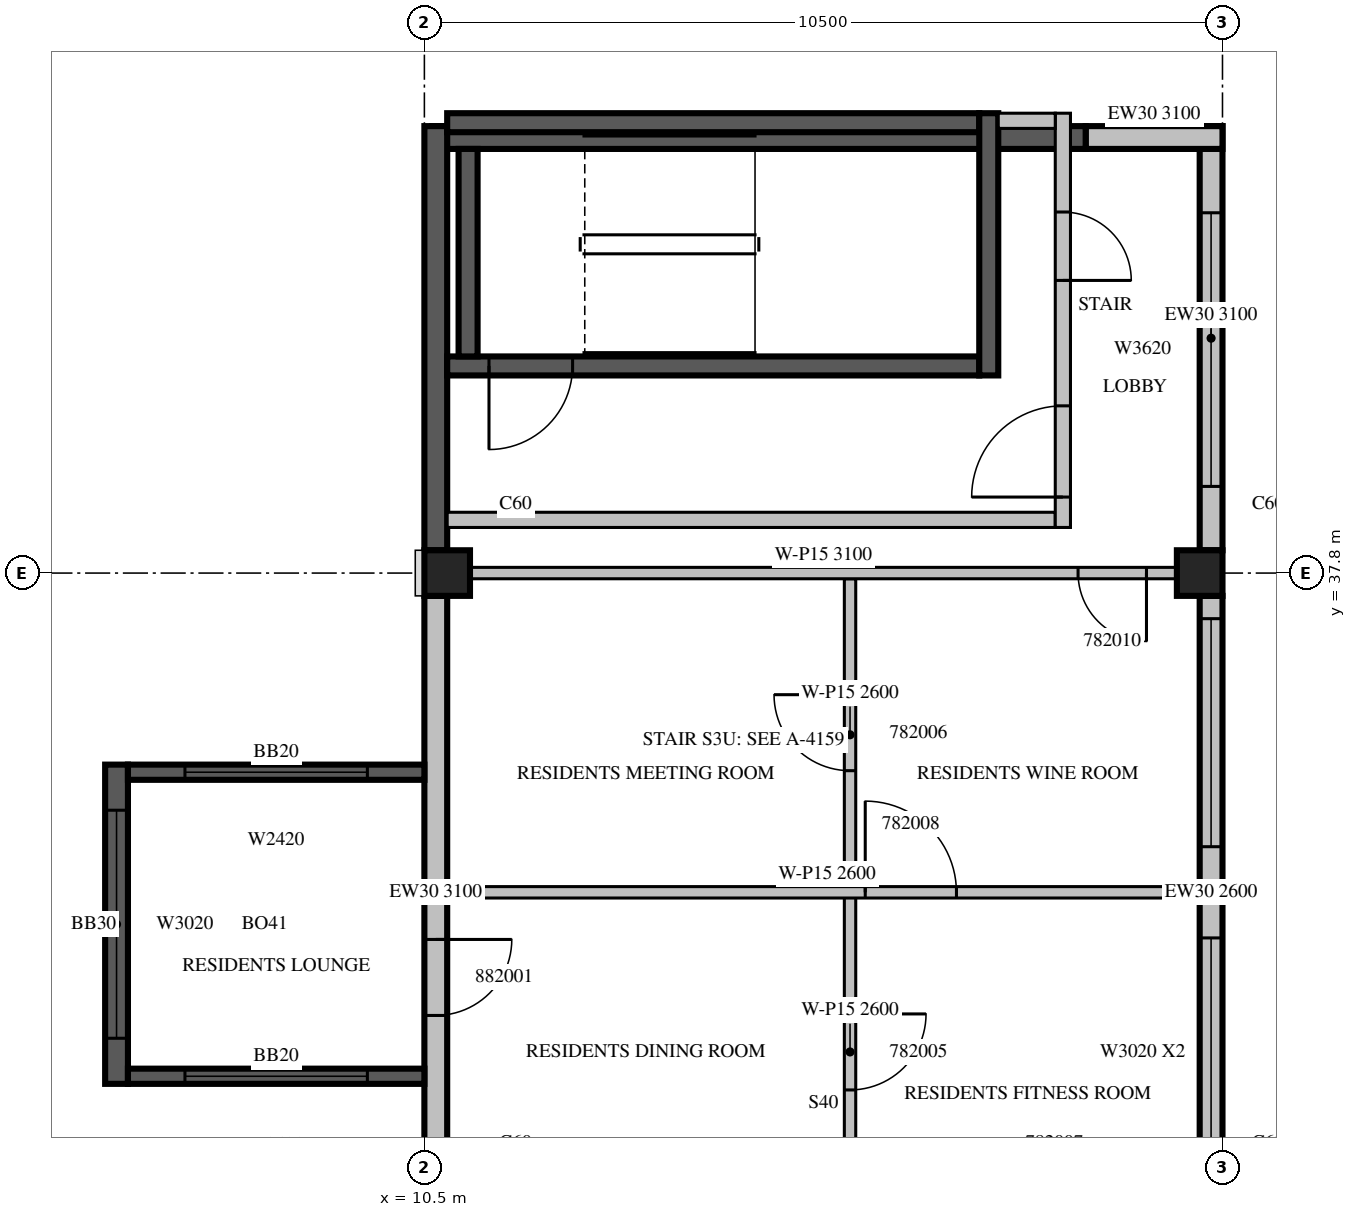
"""IFC4 building model, lengths in metres.
Left out: names, types, materials, properties, quantities, classifications, styles, units other than length and angle.
Written with IfcOpenShell. Run it as: python <this file> out.ifc"""

import sys

from ifc_helpers import new_model, si_unit, direction, frame, frame_2d, origin, origin_2d, place, context, subcontext, project, spatial, rectangle, extrude, source, transform, mapped, element, fill, save


model = new_model("IFC4")
c1 = context("Model", 3, precision=1e-05, world=origin(), true_north=direction((0.0, 1.0)))
c2 = subcontext(c1, "Body", "Model", "MODEL_VIEW")
j1 = project(units=[si_unit("LENGTHUNIT", "METRE"), si_unit("PLANEANGLEUNIT", "RADIAN")], contexts=[c1])
p1 = place(None, origin())
s1 = spatial("IfcSite", under=j1, at=p1, CompositionType="ELEMENT")
p2 = place(p1, origin())
s2 = spatial("IfcBuilding", under=s1, at=p2, CompositionType="ELEMENT")
p3 = place(p2, frame((0.0, 0.0, 347.5)))
s3 = spatial("IfcBuildingStorey", under=s2, at=p3, CompositionType="ELEMENT", Elevation=347.5)
m1 = source(origin(), c2, "Body", "SweptSolid", [
    extrude(rectangle(XDim=0.6, YDim=0.6, at=origin_2d()), origin(), (0.0, 0.0, 1.0), 3.5),
])
for number, where, z_axis, x_axis in (
    (1, (10.8, 37.8, 0.0), (0.0, 0.0, 1.0), (1.0, 0.0, 0.0)),
    (2, (20.7, 37.8, 0.0), (0.0, 0.0, 1.0), (1.0, 0.0, 0.0)),
):
    element("IfcColumn", number, at=place(p3, frame(where, z_axis=z_axis, x_axis=x_axis)), inside=s3, PredefinedType="COLUMN", context=c2, shape_type="MappedRepresentation", body=[
        mapped(m1, transform((0.0, 0.0, 0.0), scale=1.0)),
    ])
m2 = source(origin(), c2, "Body", "SweptSolid", [
    extrude(rectangle(XDim=7.8, YDim=0.3, at=frame_2d((3.9, 0.0))), origin(), (0.0, 0.0, 1.0), 2.6),
])
p4 = place(p3, frame((20.85, 29.7, 0.0), z_axis=(0.0, 0.0, 1.0), x_axis=(0.0, 1.0, 0.0)))
e3 = element("IfcWall", 3, at=p4, inside=s3, PredefinedType="STANDARD", context=c2, shape_type="MappedRepresentation", body=[
    mapped(m2, transform((0.0, 0.0, 0.0), scale=1.0)),
])
m3 = source(origin(), c2, "Body", "SweptSolid", [
    extrude(rectangle(XDim=3.0, YDim=2.0, at=frame_2d((1.5, 1.0))), frame((0.0, 0.16, 0.0), z_axis=(0.0, -1.0, 0.0), x_axis=(1.0, 0.0, 0.0)), (0.0, 0.0, 1.0), 0.32),
])
p5 = place(p4, frame((0.3, 0.0, 0.6)))
e4 = element("IfcOpeningElement", 4, at=p5, cuts=e3, PredefinedType="OPENING", context=c2, shape_type="MappedRepresentation", body=[
    mapped(m3, transform((0.0, 0.0, 0.0), scale=1.0)),
])
p6 = place(p4, frame((4.5, 0.0, 0.6)))
e5 = element("IfcOpeningElement", 5, at=p6, cuts=e3, PredefinedType="OPENING", context=c2, shape_type="MappedRepresentation", body=[
    mapped(m3, transform((0.0, 0.0, 0.0), scale=1.0)),
])
m4 = source(origin(), c2, "Body", "SweptSolid", [
    extrude(rectangle(XDim=5.58, YDim=0.3, at=frame_2d((2.79, 0.0))), origin(), (0.0, 0.0, 1.0), 3.1),
])
p7 = place(p3, frame((20.85, 38.1, 0.0), z_axis=(0.0, 0.0, 1.0), x_axis=(0.0, 1.0, 0.0)))
e6 = element("IfcWall", 6, at=p7, inside=s3, PredefinedType="STANDARD", context=c2, shape_type="MappedRepresentation", body=[
    mapped(m4, transform((0.0, 0.0, 0.0), scale=1.0)),
])
m5 = source(origin(), c2, "Body", "SweptSolid", [
    extrude(rectangle(XDim=3.6, YDim=2.0, at=frame_2d((1.8, 1.0))), frame((0.0, 0.16, 0.0), z_axis=(0.0, -1.0, 0.0), x_axis=(1.0, 0.0, 0.0)), (0.0, 0.0, 1.0), 0.32),
])
p8 = place(p7, frame((0.84, 0.0, 0.6)))
e7 = element("IfcOpeningElement", 7, at=p8, cuts=e6, PredefinedType="OPENING", context=c2, shape_type="MappedRepresentation", body=[
    mapped(m5, transform((0.0, 0.0, 0.0), scale=1.0)),
])
m6 = source(origin(), c2, "Body", "SweptSolid", [
    extrude(rectangle(XDim=1.8, YDim=0.3, at=frame_2d((0.9, 0.0))), origin(), (0.0, 0.0, 1.0), 3.1),
])
p9 = place(p3, frame((21.0, 43.53, 0.0), z_axis=(0.0, 0.0, 1.0), x_axis=(-1.0, 0.0, 0.0)))
e8 = element("IfcWall", 8, at=p9, inside=s3, PredefinedType="STANDARD", context=c2, shape_type="MappedRepresentation", body=[
    mapped(m6, transform((0.0, 0.0, 0.0), scale=1.0)),
])
m7 = source(origin(), c2, "Body", "SweptSolid", [
    extrude(rectangle(XDim=8.6, YDim=0.3, at=frame_2d((4.3, 0.0))), origin(), (0.0, 0.0, 1.0), 3.1),
])
p10 = place(p3, frame((19.2, 43.53, 0.0), z_axis=(0.0, 0.0, 1.0), x_axis=(-1.0, 0.0, 0.0)))
e9 = element("IfcWall", 9, at=p10, inside=s3, PredefinedType="SOLIDWALL", context=c2, shape_type="MappedRepresentation", body=[
    mapped(m7, transform((0.0, 0.0, 0.0), scale=1.0)),
])
m8 = source(origin(), c2, "Body", "SweptSolid", [
    extrude(rectangle(XDim=5.58, YDim=0.3, at=frame_2d((2.79, 0.0))), origin(), (0.0, 0.0, 1.0), 3.1),
])
p11 = place(p3, frame((10.65, 43.68, 0.0), z_axis=(0.0, 0.0, 1.0), x_axis=(0.0, -1.0, 0.0)))
e10 = element("IfcWall", 10, at=p11, inside=s3, PredefinedType="SOLIDWALL", context=c2, shape_type="MappedRepresentation", body=[
    mapped(m8, transform((0.0, 0.0, 0.0), scale=1.0)),
])
m9 = source(origin(), c2, "Body", "SweptSolid", [
    extrude(rectangle(XDim=7.8, YDim=0.3, at=frame_2d((3.9, 0.0))), origin(), (0.0, 0.0, 1.0), 3.1),
])
p12 = place(p3, frame((10.65, 37.5, 0.0), z_axis=(0.0, 0.0, 1.0), x_axis=(0.0, -1.0, 0.0)))
e11 = element("IfcWall", 11, at=p12, inside=s3, PredefinedType="STANDARD", context=c2, shape_type="MappedRepresentation", body=[
    mapped(m9, transform((0.0, 0.0, 0.0), scale=1.0)),
])
m10 = source(origin(), c2, "Body", "SweptSolid", [
    extrude(rectangle(XDim=1.0, YDim=2.1, at=frame_2d((0.5, 1.05))), frame((0.0, 0.16, 0.0), z_axis=(0.0, -1.0, 0.0), x_axis=(1.0, 0.0, 0.0)), (0.0, 0.0, 1.0), 0.32),
])
p13 = place(p12, frame((4.52, 0.0, 0.0)))
e12 = element("IfcOpeningElement", 12, at=p13, cuts=e11, PredefinedType="OPENING", context=c2, shape_type="MappedRepresentation", body=[
    mapped(m10, transform((0.0, 0.0, 0.0), scale=1.0)),
])
m11 = source(origin(), c2, "Body", "SweptSolid", [
    extrude(rectangle(XDim=4.2, YDim=0.3, at=frame_2d((2.1, 0.0))), origin(), (0.0, 0.0, 1.0), 3.09),
])
p14 = place(p3, frame((6.45, 35.28, 0.0), z_axis=(0.0, 0.0, 1.0), x_axis=(0.0, -1.0, 0.0)))
e13 = element("IfcWall", 13, at=p14, inside=s3, PredefinedType="SOLIDWALL", context=c2, shape_type="MappedRepresentation", body=[
    mapped(m11, transform((0.0, 0.0, 0.0), scale=1.0)),
])
p15 = place(p14, frame((0.6, 0.0, 0.6)))
e14 = element("IfcOpeningElement", 14, at=p15, cuts=e13, PredefinedType="OPENING", context=c2, shape_type="MappedRepresentation", body=[
    mapped(m3, transform((0.0, 0.0, 0.0), scale=1.0)),
])
m12 = source(origin(), c2, "Body", "SweptSolid", [
    extrude(rectangle(XDim=3.9, YDim=0.2, at=frame_2d((1.95, 0.0))), origin(), (0.0, 0.0, 1.0), 3.09),
])
p16 = place(p3, frame((10.5, 35.18, 0.0), z_axis=(0.0, 0.0, 1.0), x_axis=(-1.0, 0.0, 0.0)))
e15 = element("IfcWall", 15, at=p16, inside=s3, PredefinedType="SOLIDWALL", context=c2, shape_type="MappedRepresentation", body=[
    mapped(m12, transform((0.0, 0.0, 0.0), scale=1.0)),
])
m13 = source(origin(), c2, "Body", "SweptSolid", [
    extrude(rectangle(XDim=2.4, YDim=2.0, at=frame_2d((1.2, 1.0))), frame((0.0, 0.11, 0.0), z_axis=(0.0, -1.0, 0.0), x_axis=(1.0, 0.0, 0.0)), (0.0, 0.0, 1.0), 0.22),
])
p17 = place(p16, frame((0.75, 0.0, 0.6)))
e16 = element("IfcOpeningElement", 16, at=p17, cuts=e15, PredefinedType="OPENING", context=c2, shape_type="MappedRepresentation", body=[
    mapped(m13, transform((0.0, 0.0, 0.0), scale=1.0)),
])
p18 = place(p3, frame((10.5, 31.18, 0.0), z_axis=(0.0, 0.0, 1.0), x_axis=(-1.0, 0.0, 0.0)))
e17 = element("IfcWall", 17, at=p18, inside=s3, PredefinedType="SOLIDWALL", context=c2, shape_type="MappedRepresentation", body=[
    mapped(m12, transform((0.0, 0.0, 0.0), scale=1.0)),
])
p19 = place(p18, frame((0.75, 0.0, 0.6)))
e18 = element("IfcOpeningElement", 18, at=p19, cuts=e17, PredefinedType="OPENING", context=c2, shape_type="MappedRepresentation", body=[
    mapped(m13, transform((0.0, 0.0, 0.0), scale=1.0)),
])
m14 = source(origin(), c2, "Body", "SweptSolid", [
    extrude(rectangle(XDim=7.0, YDim=0.25, at=frame_2d((3.5, 0.0))), origin(), (0.0, 0.0, 1.0), 3.1),
])
p20 = place(p3, frame((10.8, 40.525, 0.0), z_axis=(0.0, 0.0, 1.0), x_axis=(1.0, 0.0, 0.0)))
e19 = element("IfcWall", 19, at=p20, inside=s3, PredefinedType="SOLIDWALL", context=c2, shape_type="MappedRepresentation", body=[
    mapped(m14, transform((0.0, 0.0, 0.0), scale=1.0)),
])
m15 = source(origin(), c2, "Body", "SweptSolid", [
    extrude(rectangle(XDim=1.1, YDim=2.1, at=frame_2d((0.55, 1.05))), frame((0.0, 0.135, 0.0), z_axis=(0.0, -1.0, 0.0), x_axis=(1.0, 0.0, 0.0)), (0.0, 0.0, 1.0), 0.27),
])
p21 = place(p20, frame((0.55, 0.0, 0.0)))
e20 = element("IfcOpeningElement", 20, at=p21, cuts=e19, PredefinedType="OPENING", context=c2, shape_type="MappedRepresentation", body=[
    mapped(m15, transform((0.0, 0.0, 0.0), scale=1.0)),
])
p22 = place(p3, frame((10.8, 43.725, 0.0), z_axis=(0.0, 0.0, 1.0), x_axis=(1.0, 0.0, 0.0)))
e21 = element("IfcWall", 21, at=p22, inside=s3, PredefinedType="SOLIDWALL", context=c2, shape_type="MappedRepresentation", body=[
    mapped(m14, transform((0.0, 0.0, 0.0), scale=1.0)),
])
m16 = source(origin(), c2, "Body", "SweptSolid", [
    extrude(rectangle(XDim=3.45, YDim=0.25, at=frame_2d((1.725, 0.0))), origin(), (0.0, 0.0, 1.0), 3.1),
])
p23 = place(p3, frame((17.925, 40.4, 0.0), z_axis=(0.0, 0.0, 1.0), x_axis=(0.0, 1.0, 0.0)))
e22 = element("IfcWall", 22, at=p23, inside=s3, PredefinedType="SOLIDWALL", context=c2, shape_type="MappedRepresentation", body=[
    mapped(m16, transform((0.0, 0.0, 0.0), scale=1.0)),
])
m17 = source(origin(), c2, "Body", "SweptSolid", [
    extrude(rectangle(XDim=2.73, YDim=0.25, at=frame_2d((1.365, 0.0))), origin(), (0.0, 0.0, 1.0), 3.1),
])
p24 = place(p3, frame((11.075, 40.65, 0.0), z_axis=(0.0, 0.0, 1.0), x_axis=(0.0, 1.0, 0.0)))
e23 = element("IfcWall", 23, at=p24, inside=s3, PredefinedType="SOLIDWALL", context=c2, shape_type="MappedRepresentation", body=[
    mapped(m17, transform((0.0, 0.0, 0.0), scale=1.0)),
])
m18 = source(origin(), c2, "Body", "SweptSolid", [
    extrude(rectangle(XDim=8.0, YDim=0.2, at=frame_2d((4.0, 0.0))), origin(), (0.0, 0.0, 1.0), 3.1),
])
p25 = place(p3, frame((10.8, 38.5, 0.0), z_axis=(0.0, 0.0, 1.0), x_axis=(1.0, 0.0, 0.0)))
e24 = element("IfcWall", 24, at=p25, inside=s3, PredefinedType="PARTITIONING", context=c2, shape_type="MappedRepresentation", body=[
    mapped(m18, transform((0.0, 0.0, 0.0), scale=1.0)),
])
m19 = source(origin(), c2, "Body", "SweptSolid", [
    extrude(rectangle(XDim=5.45, YDim=0.2, at=frame_2d((2.725, 0.0))), origin(), (0.0, 0.0, 1.0), 3.1),
])
p26 = place(p3, frame((18.9, 38.4, 0.0), z_axis=(0.0, 0.0, 1.0), x_axis=(0.0, 1.0, 0.0)))
e25 = element("IfcWall", 25, at=p26, inside=s3, PredefinedType="PARTITIONING", context=c2, shape_type="MappedRepresentation", body=[
    mapped(m19, transform((0.0, 0.0, 0.0), scale=1.0)),
])
m20 = source(origin(), c2, "Body", "SweptSolid", [
    extrude(rectangle(XDim=1.2, YDim=2.1, at=frame_2d((0.6, 1.05))), frame((0.0, 0.11, 0.0), z_axis=(0.0, -1.0, 0.0), x_axis=(1.0, 0.0, 0.0)), (0.0, 0.0, 1.0), 0.22),
])
p27 = place(p26, frame((0.4, 0.0, 0.0)))
e26 = element("IfcOpeningElement", 26, at=p27, cuts=e25, PredefinedType="OPENING", context=c2, shape_type="MappedRepresentation", body=[
    mapped(m20, transform((0.0, 0.0, 0.0), scale=1.0)),
])
m21 = source(origin(), c2, "Body", "SweptSolid", [
    extrude(rectangle(XDim=0.9, YDim=2.1, at=frame_2d((0.45, 1.05))), frame((0.0, 0.11, 0.0), z_axis=(0.0, -1.0, 0.0), x_axis=(1.0, 0.0, 0.0)), (0.0, 0.0, 1.0), 0.22),
])
p28 = place(p26, frame((3.25, 0.0, 0.0)))
e27 = element("IfcOpeningElement", 27, at=p28, cuts=e25, PredefinedType="OPENING", context=c2, shape_type="MappedRepresentation", body=[
    mapped(m21, transform((0.0, 0.0, 0.0), scale=1.0)),
])
m22 = source(origin(), c2, "Body", "SweptSolid", [
    extrude(rectangle(XDim=0.75, YDim=0.2, at=frame_2d((0.375, 0.0))), origin(), (0.0, 0.0, 1.0), 3.1),
])
p29 = place(p3, frame((18.05, 43.75, 0.0), z_axis=(0.0, 0.0, 1.0), x_axis=(1.0, 0.0, 0.0)))
e28 = element("IfcWall", 28, at=p29, inside=s3, PredefinedType="PARTITIONING", context=c2, shape_type="MappedRepresentation", body=[
    mapped(m22, transform((0.0, 0.0, 0.0), scale=1.0)),
])
m23 = source(origin(), c2, "Body", "SweptSolid", [
    extrude(rectangle(XDim=4.2, YDim=0.15, at=frame_2d((2.1, 0.0))), origin(), (0.0, 0.0, 1.0), 2.6),
])
p30 = place(p3, frame((16.1, 33.6, 0.0), z_axis=(0.0, 0.0, 1.0), x_axis=(0.0, -1.0, 0.0)))
e29 = element("IfcWall", 29, at=p30, inside=s3, PredefinedType="PARTITIONING", context=c2, shape_type="MappedRepresentation", body=[
    mapped(m23, transform((0.0, 0.0, 0.0), scale=1.0)),
])
m24 = source(origin(), c2, "Body", "SweptSolid", [
    extrude(rectangle(XDim=1.0, YDim=2.1, at=frame_2d((0.5, 1.05))), frame((0.0, 0.085, 0.0), z_axis=(0.0, -1.0, 0.0), x_axis=(1.0, 0.0, 0.0)), (0.0, 0.0, 1.0), 0.17),
])
p31 = place(p30, frame((1.6, 0.0, 0.0)))
e30 = element("IfcOpeningElement", 30, at=p31, cuts=e29, PredefinedType="OPENING", context=c2, shape_type="MappedRepresentation", body=[
    mapped(m24, transform((0.0, 0.0, 0.0), scale=1.0)),
])
m25 = source(origin(), c2, "Body", "SweptSolid", [
    extrude(rectangle(XDim=4.105, YDim=0.15, at=frame_2d((2.053, 0.0))), origin(), (0.0, 0.0, 1.0), 2.6),
])
p32 = place(p3, frame((16.1, 37.725, 0.0), z_axis=(0.0, 0.0, 1.0), x_axis=(0.0, -1.0, 0.0)))
e31 = element("IfcWall", 31, at=p32, inside=s3, PredefinedType="PARTITIONING", context=c2, shape_type="MappedRepresentation", body=[
    mapped(m25, transform((0.0, 0.0, 0.0), scale=1.0)),
])
p33 = place(p32, frame((1.525, 0.0, 0.0)))
e32 = element("IfcOpeningElement", 32, at=p33, cuts=e31, PredefinedType="OPENING", context=c2, shape_type="MappedRepresentation", body=[
    mapped(m24, transform((0.0, 0.0, 0.0), scale=1.0)),
])
m26 = source(origin(), c2, "Body", "SweptSolid", [
    extrude(rectangle(XDim=9.995, YDim=0.15, at=frame_2d((4.997, 0.0))), origin(), (0.0, 0.0, 1.0), 2.6),
])
p34 = place(p3, frame((10.8, 33.6, 0.0), z_axis=(0.0, 0.0, 1.0), x_axis=(1.0, 0.0, 0.0)))
e33 = element("IfcWall", 33, at=p34, inside=s3, PredefinedType="PARTITIONING", context=c2, shape_type="MappedRepresentation", body=[
    mapped(m26, transform((0.0, 0.0, 0.0), scale=1.0)),
])
m27 = source(origin(), c2, "Body", "SweptSolid", [
    extrude(rectangle(XDim=1.2, YDim=2.1, at=frame_2d((0.6, 1.05))), frame((0.0, 0.085, 0.0), z_axis=(0.0, -1.0, 0.0), x_axis=(1.0, 0.0, 0.0)), (0.0, 0.0, 1.0), 0.17),
])
p35 = place(p34, frame((5.5, 0.0, 0.0)))
e34 = element("IfcOpeningElement", 34, at=p35, cuts=e33, PredefinedType="OPENING", context=c2, shape_type="MappedRepresentation", body=[
    mapped(m27, transform((0.0, 0.0, 0.0), scale=1.0)),
])
m28 = source(origin(), c2, "Body", "SweptSolid", [
    extrude(rectangle(XDim=9.302, YDim=0.15, at=frame_2d((4.651, 0.0))), origin(), (0.0, 0.0, 1.0), 3.1),
])
p36 = place(p3, frame((20.401, 37.8, 0.0), z_axis=(0.0, 0.0, 1.0), x_axis=(-1.0, 0.0, 0.0)))
e35 = element("IfcWall", 35, at=p36, inside=s3, PredefinedType="PARTITIONING", context=c2, shape_type="MappedRepresentation", body=[
    mapped(m28, transform((0.0, 0.0, 0.0), scale=1.0)),
])
m29 = source(origin(), c2, "Body", "SweptSolid", [
    extrude(rectangle(XDim=0.9, YDim=2.1, at=frame_2d((0.45, 1.05))), frame((0.0, 0.085, 0.0), z_axis=(0.0, -1.0, 0.0), x_axis=(1.0, 0.0, 0.0)), (0.0, 0.0, 1.0), 0.17),
])
p37 = place(p36, frame((0.401, 0.0, 0.0)))
e36 = element("IfcOpeningElement", 36, at=p37, cuts=e35, PredefinedType="OPENING", context=c2, shape_type="MappedRepresentation", body=[
    mapped(m29, transform((0.0, 0.0, 0.0), scale=1.0)),
])
m30 = source(origin(), c2, "Body", "SweptSolid", [
    extrude(rectangle(XDim=3.0, YDim=2.0, at=frame_2d((1.5, 1.0))), frame((0.0, 0.03, 0.0), z_axis=(0.0, -1.0, 0.0), x_axis=(1.0, 0.0, 0.0)), (0.0, 0.0, 1.0), 0.06),
])
p38 = place(p5, origin())
e37 = element("IfcWindow", 37, at=p38, inside=s3, PartitioningType="SINGLE_PANEL", PredefinedType="WINDOW", context=c2, shape_type="MappedRepresentation", body=[
    mapped(m30, transform((0.0, 0.0, 0.0), scale=1.0)),
])
fill(e4, e37)
p39 = place(p6, origin())
e38 = element("IfcWindow", 38, at=p39, inside=s3, PartitioningType="SINGLE_PANEL", PredefinedType="WINDOW", context=c2, shape_type="MappedRepresentation", body=[
    mapped(m30, transform((0.0, 0.0, 0.0), scale=1.0)),
])
fill(e5, e38)
m31 = source(origin(), c2, "Body", "SweptSolid", [
    extrude(rectangle(XDim=3.6, YDim=2.0, at=frame_2d((1.8, 1.0))), frame((0.0, 0.03, 0.0), z_axis=(0.0, -1.0, 0.0), x_axis=(1.0, 0.0, 0.0)), (0.0, 0.0, 1.0), 0.06),
])
p40 = place(p8, origin())
e39 = element("IfcWindow", 39, at=p40, inside=s3, PartitioningType="SINGLE_PANEL", PredefinedType="WINDOW", context=c2, shape_type="MappedRepresentation", body=[
    mapped(m31, transform((0.0, 0.0, 0.0), scale=1.0)),
])
fill(e7, e39)
p41 = place(p15, origin())
e40 = element("IfcWindow", 40, at=p41, inside=s3, PartitioningType="SINGLE_PANEL", PredefinedType="WINDOW", context=c2, shape_type="MappedRepresentation", body=[
    mapped(m30, transform((0.0, 0.0, 0.0), scale=1.0)),
])
fill(e14, e40)
m32 = source(origin(), c2, "Body", "SweptSolid", [
    extrude(rectangle(XDim=2.4, YDim=2.0, at=frame_2d((1.2, 1.0))), frame((0.0, 0.03, 0.0), z_axis=(0.0, -1.0, 0.0), x_axis=(1.0, 0.0, 0.0)), (0.0, 0.0, 1.0), 0.06),
])
p42 = place(p17, origin())
e41 = element("IfcWindow", 41, at=p42, inside=s3, PartitioningType="SINGLE_PANEL", PredefinedType="WINDOW", context=c2, shape_type="MappedRepresentation", body=[
    mapped(m32, transform((0.0, 0.0, 0.0), scale=1.0)),
])
fill(e16, e41)
p43 = place(p19, origin())
e42 = element("IfcWindow", 42, at=p43, inside=s3, PartitioningType="SINGLE_PANEL", PredefinedType="WINDOW", context=c2, shape_type="MappedRepresentation", body=[
    mapped(m32, transform((0.0, 0.0, 0.0), scale=1.0)),
])
fill(e18, e42)
m33 = source(origin(), c2, "Body", "SweptSolid", [
    extrude(rectangle(XDim=1.1, YDim=2.1, at=frame_2d((0.55, 1.05))), frame((0.0, 0.025, 0.0), z_axis=(0.0, -1.0, 0.0), x_axis=(1.0, 0.0, 0.0)), (0.0, 0.0, 1.0), 0.05),
])
p44 = place(p21, origin())
e43 = element("IfcDoor", 43, at=p44, inside=s3, OperationType="SINGLE_SWING_RIGHT", PredefinedType="DOOR", context=c2, shape_type="MappedRepresentation", body=[
    mapped(m33, transform((0.0, 0.0, 0.0), scale=1.0)),
])
fill(e20, e43)
m34 = source(origin(), c2, "Body", "SweptSolid", [
    extrude(rectangle(XDim=1.2, YDim=2.1, at=frame_2d((0.6, 1.05))), frame((0.0, 0.025, 0.0), z_axis=(0.0, -1.0, 0.0), x_axis=(1.0, 0.0, 0.0)), (0.0, 0.0, 1.0), 0.05),
])
p45 = place(p27, origin())
e44 = element("IfcDoor", 44, at=p45, inside=s3, OperationType="SINGLE_SWING_LEFT", PredefinedType="DOOR", context=c2, shape_type="MappedRepresentation", body=[
    mapped(m34, transform((0.0, 0.0, 0.0), scale=1.0)),
])
fill(e26, e44)
m35 = source(origin(), c2, "Body", "SweptSolid", [
    extrude(rectangle(XDim=0.9, YDim=2.1, at=frame_2d((0.45, 1.05))), frame((0.0, 0.025, 0.0), z_axis=(0.0, -1.0, 0.0), x_axis=(1.0, 0.0, 0.0)), (0.0, 0.0, 1.0), 0.05),
])
p46 = place(p28, origin())
e45 = element("IfcDoor", 45, at=p46, inside=s3, OperationType="SINGLE_SWING_RIGHT", PredefinedType="DOOR", context=c2, shape_type="MappedRepresentation", body=[
    mapped(m35, transform((0.0, 0.0, 0.0), scale=1.0)),
])
fill(e27, e45)
m36 = source(origin(), c2, "Body", "SweptSolid", [
    extrude(rectangle(XDim=1.0, YDim=2.1, at=frame_2d((0.5, 1.05))), frame((0.0, 0.025, 0.0), z_axis=(0.0, -1.0, 0.0), x_axis=(1.0, 0.0, 0.0)), (0.0, 0.0, 1.0), 0.05),
])
p47 = place(p31, origin())
e46 = element("IfcDoor", 46, at=p47, inside=s3, OperationType="SINGLE_SWING_LEFT", PredefinedType="DOOR", context=c2, shape_type="MappedRepresentation", body=[
    mapped(m36, transform((0.0, 0.0, 0.0), scale=1.0)),
])
fill(e30, e46)
p48 = place(p33, origin())
e47 = element("IfcDoor", 47, at=p48, inside=s3, OperationType="SINGLE_SWING_RIGHT", PredefinedType="DOOR", context=c2, shape_type="MappedRepresentation", body=[
    mapped(m36, transform((0.0, 0.0, 0.0), scale=1.0)),
])
fill(e32, e47)
p49 = place(p35, origin())
e48 = element("IfcDoor", 48, at=p49, inside=s3, OperationType="SINGLE_SWING_LEFT", PredefinedType="DOOR", context=c2, shape_type="MappedRepresentation", body=[
    mapped(m34, transform((0.0, 0.0, 0.0), scale=1.0)),
])
fill(e34, e48)
p50 = place(p37, origin())
e49 = element("IfcDoor", 49, at=p50, inside=s3, OperationType="SINGLE_SWING_LEFT", PredefinedType="DOOR", context=c2, shape_type="MappedRepresentation", body=[
    mapped(m35, transform((0.0, 0.0, 0.0), scale=1.0)),
])
fill(e36, e49)
p51 = place(p13, origin())
e50 = element("IfcDoor", 50, at=p51, inside=s3, OperationType="SINGLE_SWING_LEFT", PredefinedType="DOOR", context=c2, shape_type="MappedRepresentation", body=[
    mapped(m36, transform((0.0, 0.0, 0.0), scale=1.0)),
])
fill(e12, e50)
save(model, sys.argv[1])
